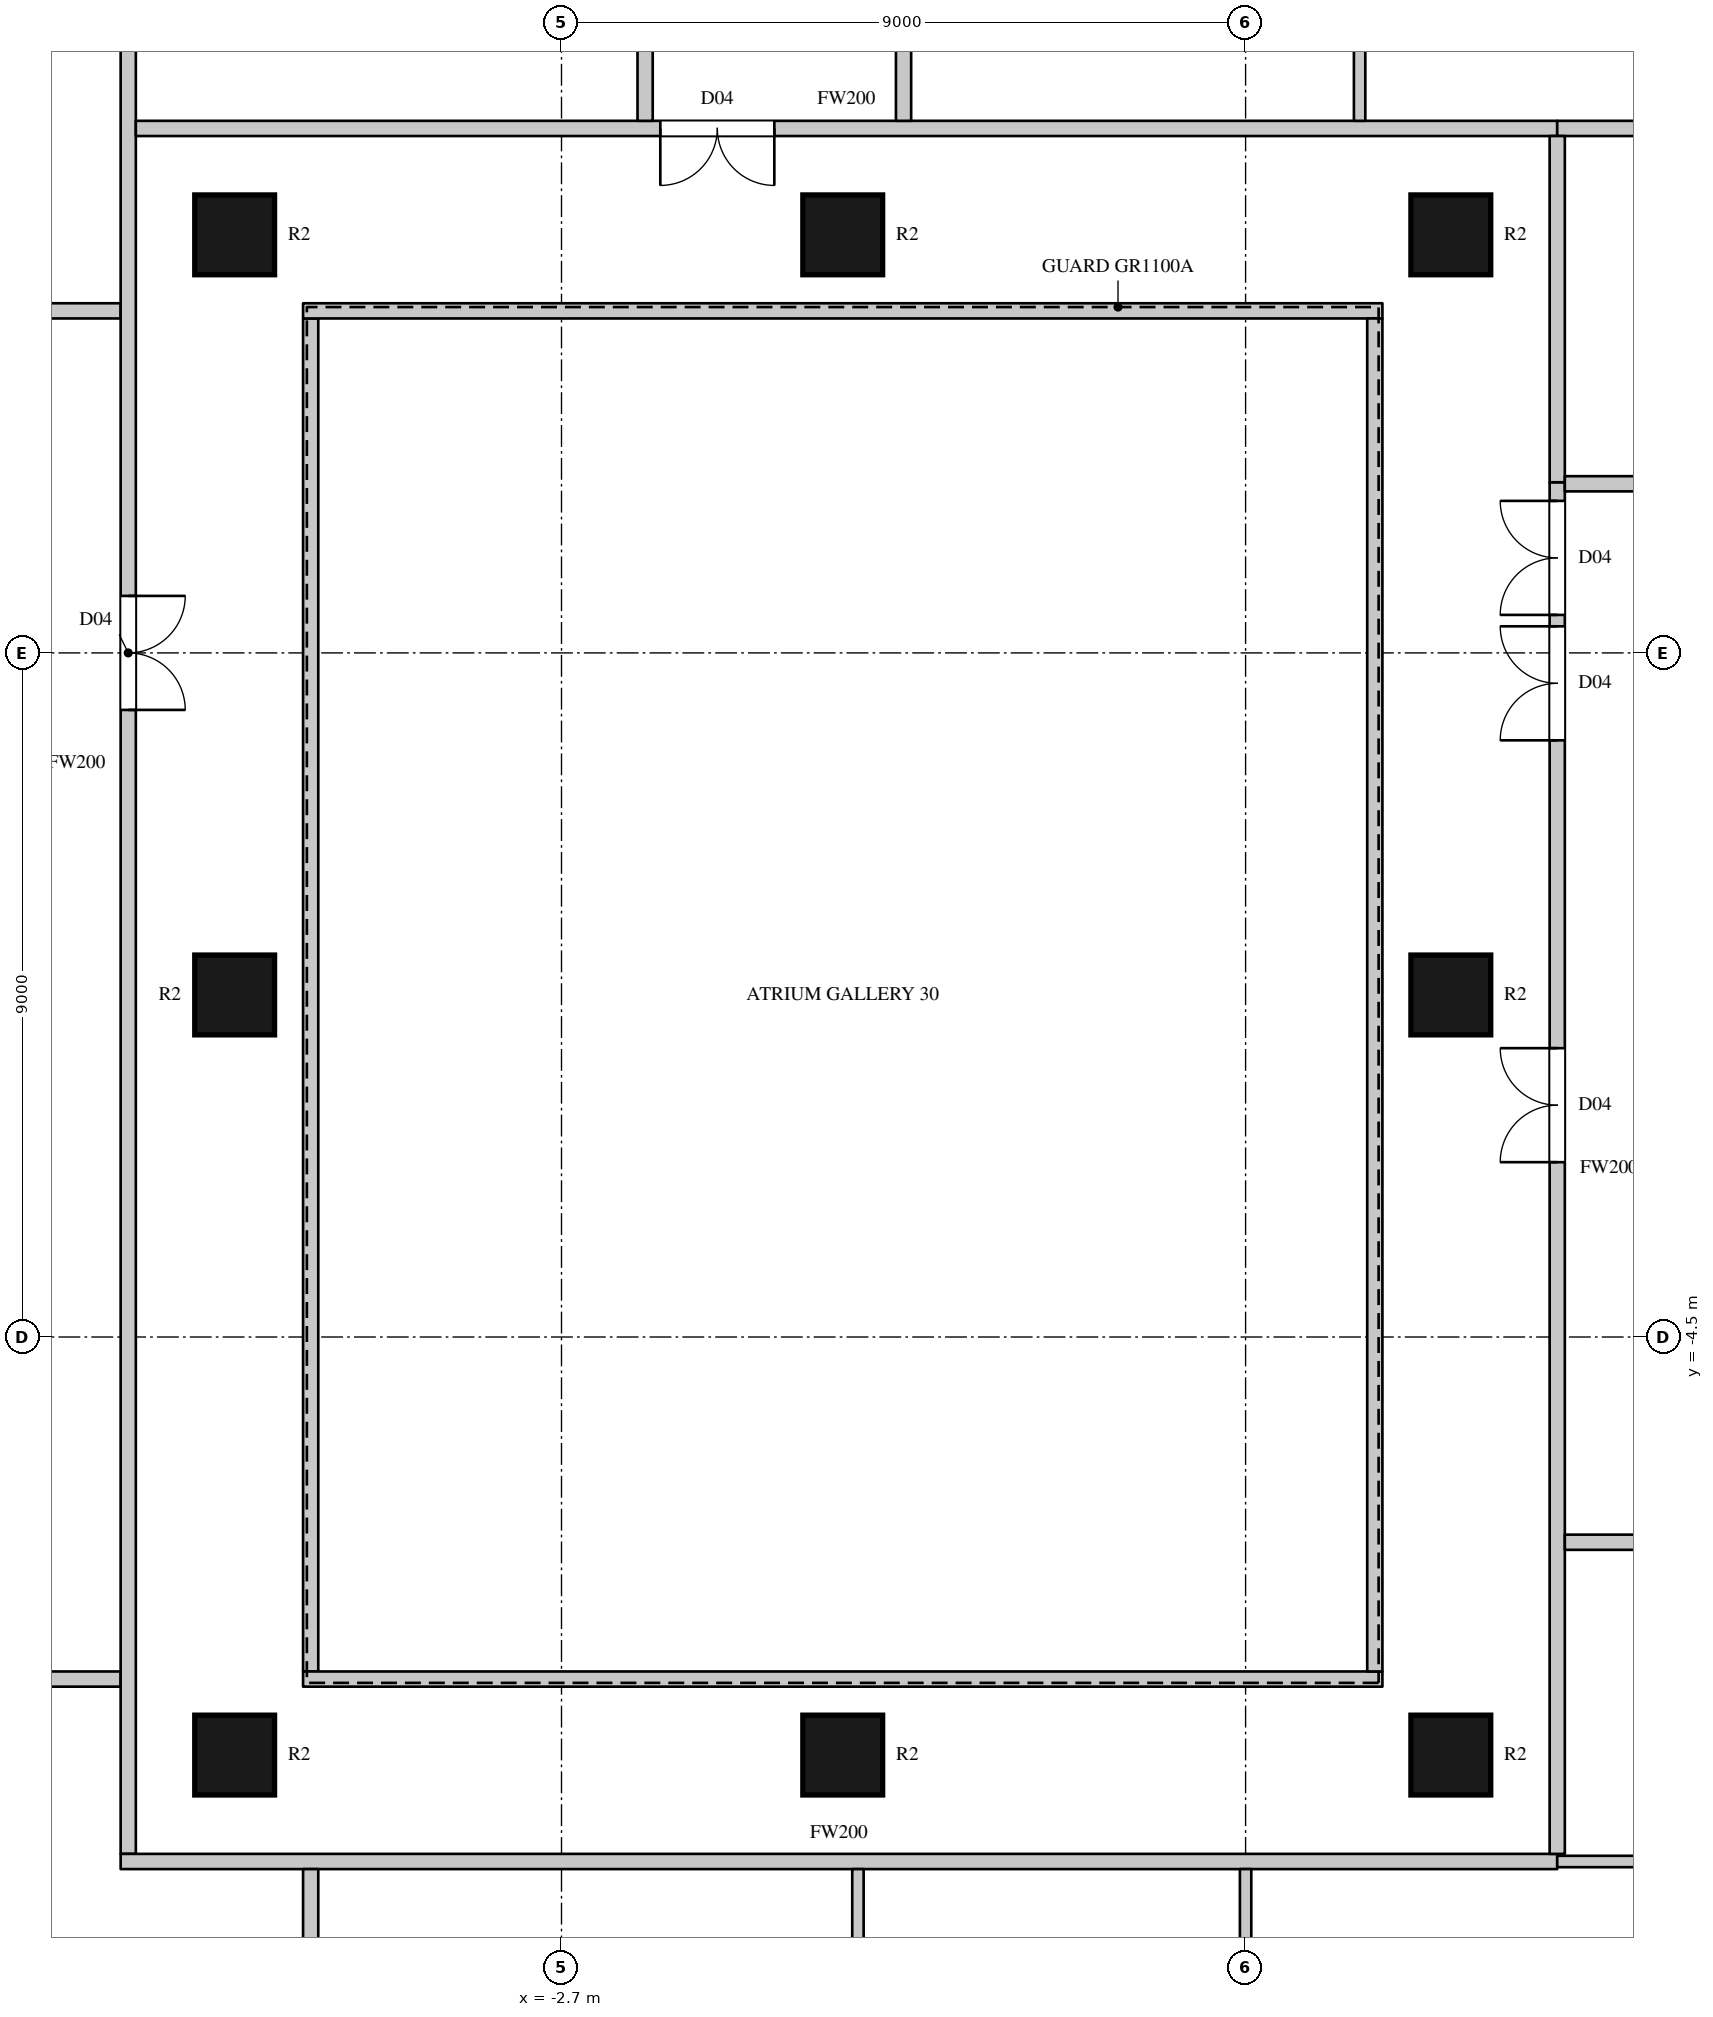
"""IFC4 building model, lengths in metres.
Left out: names, types, materials, properties, quantities, classifications, styles, units other than length and angle.
Written with IfcOpenShell. Run it as: python <this file> out.ifc"""

import sys

from ifc_helpers import new_model, si_unit, direction, frame, frame_2d, origin, origin_2d, place, context, subcontext, project, spatial, rectangle, circle, extrude, element, fill, save


model = new_model("IFC4")
c1 = context("Model", 3, precision=1e-05, world=origin(), true_north=direction((0.0, 1.0)))
c2 = subcontext(c1, "Body", "Model", "MODEL_VIEW")
j1 = project(units=[si_unit("LENGTHUNIT", "METRE"), si_unit("PLANEANGLEUNIT", "RADIAN")], contexts=[c1])
p1 = place(None, origin())
s1 = spatial("IfcSite", under=j1, at=p1, CompositionType="ELEMENT")
p2 = place(p1, origin())
s2 = spatial("IfcBuilding", under=s1, at=p2, CompositionType="ELEMENT")
p3 = place(p2, frame((0.0, 0.0, 138.3)))
s3 = spatial("IfcBuildingStorey", under=s2, at=p3, CompositionType="ELEMENT", Elevation=138.3)
for number, where, z_axis, x_axis in (
    (1, (-7.0, -10.0, 0.0), (0.0, 0.0, 1.0), (1.0, 0.0, 0.0)),
    (2, (-7.0, 0.0, 0.0), (0.0, 0.0, 1.0), (1.0, 0.0, 0.0)),
    (3, (-7.0, 10.0, 0.0), (0.0, 0.0, 1.0), (1.0, 0.0, 0.0)),
    (4, (1.0, -10.0, 0.0), (0.0, 0.0, 1.0), (1.0, 0.0, 0.0)),
    (5, (1.0, 10.0, 0.0), (0.0, 0.0, 1.0), (1.0, 0.0, 0.0)),
    (6, (9.0, -10.0, 0.0), (0.0, 0.0, 1.0), (1.0, 0.0, 0.0)),
    (7, (9.0, 0.0, 0.0), (0.0, 0.0, 1.0), (1.0, 0.0, 0.0)),
    (8, (9.0, 10.0, 0.0), (0.0, 0.0, 1.0), (1.0, 0.0, 0.0)),
):
    element("IfcColumn", number, at=place(p3, frame(where, z_axis=z_axis, x_axis=x_axis)), inside=s3, PredefinedType="COLUMN", context=c2, shape_type="SweptSolid", body=[
        extrude(circle(Radius=0.525, at=origin_2d()), origin(), (0.0, 0.0, 1.0), 3.6),
    ])
p4 = place(p3, frame((-13.97, -9.0, 0.0), z_axis=(0.0, 0.0, 1.0), x_axis=(1.0, 0.0, 0.0)))
e9 = element("IfcWall", 9, at=p4, inside=s3, PredefinedType="PARTITIONING", context=c2, shape_type="SweptSolid", body=[
    extrude(rectangle(XDim=5.47, YDim=0.2, at=frame_2d((2.735, 0.0))), origin(), (0.0, 0.0, 1.0), 3.3),
])
p5 = place(p4, frame((0.4, 0.0, 0.0)))
e10 = element("IfcOpeningElement", 10, at=p5, cuts=e9, PredefinedType="OPENING", context=c2, shape_type="SweptSolid", body=[
    extrude(rectangle(XDim=1.5, YDim=2.2, at=frame_2d((0.75, 1.1))), frame((0.0, 0.11, 0.0), z_axis=(0.0, -1.0, 0.0), x_axis=(1.0, 0.0, 0.0)), (0.0, 0.0, 1.0), 0.22),
])
p6 = place(p4, frame((2.05, 0.0, 0.0)))
e11 = element("IfcOpeningElement", 11, at=p6, cuts=e9, PredefinedType="OPENING", context=c2, shape_type="SweptSolid", body=[
    extrude(rectangle(XDim=1.5, YDim=2.2, at=frame_2d((0.75, 1.1))), frame((0.0, 0.11, 0.0), z_axis=(0.0, -1.0, 0.0), x_axis=(1.0, 0.0, 0.0)), (0.0, 0.0, 1.0), 0.22),
])
p7 = place(p3, frame((-13.97, 9.0, 0.0), z_axis=(0.0, 0.0, 1.0), x_axis=(1.0, 0.0, 0.0)))
e12 = element("IfcWall", 12, at=p7, inside=s3, PredefinedType="PARTITIONING", context=c2, shape_type="SweptSolid", body=[
    extrude(rectangle(XDim=5.47, YDim=0.2, at=frame_2d((2.735, 0.0))), origin(), (0.0, 0.0, 1.0), 3.3),
])
p8 = place(p3, frame((-8.4, -11.3, 0.0), z_axis=(0.0, 0.0, 1.0), x_axis=(0.0, 1.0, 0.0)))
e13 = element("IfcWall", 13, at=p8, inside=s3, PredefinedType="PARTITIONING", context=c2, shape_type="SweptSolid", body=[
    extrude(rectangle(XDim=28.7, YDim=0.2, at=frame_2d((14.35, 0.0))), origin(), (0.0, 0.0, 1.0), 3.3),
])
p9 = place(p8, frame((15.05, 0.0, 0.0)))
e14 = element("IfcOpeningElement", 14, at=p9, cuts=e13, PredefinedType="OPENING", context=c2, shape_type="SweptSolid", body=[
    extrude(rectangle(XDim=1.5, YDim=2.2, at=frame_2d((0.75, 1.1))), frame((0.0, 0.11, 0.0), z_axis=(0.0, -1.0, 0.0), x_axis=(1.0, 0.0, 0.0)), (0.0, 0.0, 1.0), 0.22),
])
p10 = place(p8, frame((26.95, 0.0, 0.0)))
e15 = element("IfcOpeningElement", 15, at=p10, cuts=e13, PredefinedType="OPENING", context=c2, shape_type="SweptSolid", body=[
    extrude(rectangle(XDim=1.6, YDim=2.4, at=frame_2d((0.8, 1.2))), frame((0.0, 0.11, 0.0), z_axis=(0.0, -1.0, 0.0), x_axis=(1.0, 0.0, 0.0)), (0.0, 0.0, 1.0), 0.22),
])
p11 = place(p3, frame((-8.5, -11.4, 0.0), z_axis=(0.0, 0.0, 1.0), x_axis=(1.0, 0.0, 0.0)))
e16 = element("IfcWall", 16, at=p11, inside=s3, PredefinedType="PARTITIONING", context=c2, shape_type="SweptSolid", body=[
    extrude(rectangle(XDim=18.9, YDim=0.2, at=frame_2d((9.45, 0.0))), origin(), (0.0, 0.0, 1.0), 3.3),
])
p12 = place(p3, frame((-8.3, 11.4, 0.0), z_axis=(0.0, 0.0, 1.0), x_axis=(1.0, 0.0, 0.0)))
e17 = element("IfcWall", 17, at=p12, inside=s3, PredefinedType="PARTITIONING", context=c2, shape_type="SweptSolid", body=[
    extrude(rectangle(XDim=18.7, YDim=0.2, at=frame_2d((9.35, 0.0))), origin(), (0.0, 0.0, 1.0), 3.3),
])
p13 = place(p12, frame((6.9, 0.0, 0.0)))
e18 = element("IfcOpeningElement", 18, at=p13, cuts=e17, PredefinedType="OPENING", context=c2, shape_type="SweptSolid", body=[
    extrude(rectangle(XDim=1.5, YDim=2.2, at=frame_2d((0.75, 1.1))), frame((0.0, 0.11, 0.0), z_axis=(0.0, -1.0, 0.0), x_axis=(1.0, 0.0, 0.0)), (0.0, 0.0, 1.0), 0.22),
])
p14 = place(p3, frame((-6.0, -17.4, 0.0), z_axis=(0.0, 0.0, 1.0), x_axis=(0.0, 1.0, 0.0)))
e19 = element("IfcWall", 19, at=p14, inside=s3, PredefinedType="PARTITIONING", context=c2, shape_type="SweptSolid", body=[
    extrude(rectangle(XDim=5.9, YDim=0.2, at=frame_2d((2.95, 0.0))), origin(), (0.0, 0.0, 1.0), 3.3),
])
p15 = place(p14, frame((0.15, 0.0, 0.0)))
e20 = element("IfcOpeningElement", 20, at=p15, cuts=e19, PredefinedType="OPENING", context=c2, shape_type="SweptSolid", body=[
    extrude(rectangle(XDim=0.95, YDim=2.2, at=frame_2d((0.475, 1.1))), frame((0.0, 0.11, 0.0), z_axis=(0.0, -1.0, 0.0), x_axis=(1.0, 0.0, 0.0)), (0.0, 0.0, 1.0), 0.22),
])
p16 = place(p3, frame((-6.0, -8.9, 0.0), z_axis=(0.0, 0.0, 1.0), x_axis=(0.0, 1.0, 0.0)))
e21 = element("IfcWall", 21, at=p16, inside=s3, PredefinedType="PARTITIONING", context=c2, shape_type="SweptSolid", body=[
    extrude(rectangle(XDim=17.8, YDim=0.2, at=frame_2d((8.9, 0.0))), origin(), (0.0, 0.0, 1.0), 3.3),
])
for number, where, z_axis, x_axis in (
    (22, (-6.1, -9.0, 0.0), (0.0, 0.0, 1.0), (1.0, 0.0, 0.0)),
    (23, (-6.1, 9.0, 0.0), (0.0, 0.0, 1.0), (1.0, 0.0, 0.0)),
):
    element("IfcWall", number, at=place(p3, frame(where, z_axis=z_axis, x_axis=x_axis)), inside=s3, PredefinedType="PARTITIONING", context=c2, shape_type="SweptSolid", body=[
        extrude(rectangle(XDim=14.2, YDim=0.2, at=frame_2d((7.1, 0.0))), origin(), (0.0, 0.0, 1.0), 3.3),
    ])
p17 = place(p3, frame((-1.6, 11.5, 0.0), z_axis=(0.0, 0.0, 1.0), x_axis=(0.0, 1.0, 0.0)))
e24 = element("IfcWall", 24, at=p17, inside=s3, PredefinedType="PARTITIONING", context=c2, shape_type="SweptSolid", body=[
    extrude(rectangle(XDim=5.9, YDim=0.2, at=frame_2d((2.95, 0.0))), origin(), (0.0, 0.0, 1.0), 3.3),
])
p18 = place(p3, frame((1.8, 11.5, 0.0), z_axis=(0.0, 0.0, 1.0), x_axis=(0.0, 1.0, 0.0)))
e25 = element("IfcWall", 25, at=p18, inside=s3, PredefinedType="PARTITIONING", context=c2, shape_type="SweptSolid", body=[
    extrude(rectangle(XDim=5.9, YDim=0.2, at=frame_2d((2.95, 0.0))), origin(), (0.0, 0.0, 1.0), 3.3),
])
p19 = place(p18, frame((4.15, 0.0, 0.0)))
e26 = element("IfcOpeningElement", 26, at=p19, cuts=e25, PredefinedType="OPENING", context=c2, shape_type="SweptSolid", body=[
    extrude(rectangle(XDim=1.6, YDim=2.4, at=frame_2d((0.8, 1.2))), frame((0.0, 0.11, 0.0), z_axis=(0.0, -1.0, 0.0), x_axis=(1.0, 0.0, 0.0)), (0.0, 0.0, 1.0), 0.22),
])
p20 = place(p3, frame((8.0, -8.9, 0.0), z_axis=(0.0, 0.0, 1.0), x_axis=(0.0, 1.0, 0.0)))
e27 = element("IfcWall", 27, at=p20, inside=s3, PredefinedType="PARTITIONING", context=c2, shape_type="SweptSolid", body=[
    extrude(rectangle(XDim=17.8, YDim=0.2, at=frame_2d((8.9, 0.0))), origin(), (0.0, 0.0, 1.0), 3.3),
])
p21 = place(p3, frame((10.4, -11.3, 0.0), z_axis=(0.0, 0.0, 1.0), x_axis=(0.0, 1.0, 0.0)))
e28 = element("IfcWall", 28, at=p21, inside=s3, PredefinedType="PARTITIONING", context=c2, shape_type="SweptSolid", body=[
    extrude(rectangle(XDim=18.045, YDim=0.2, at=frame_2d((9.022, 0.0))), origin(), (0.0, 0.0, 1.0), 3.3),
])
p22 = place(p21, frame((16.3, 0.0, 0.0)))
e29 = element("IfcOpeningElement", 29, at=p22, cuts=e28, PredefinedType="OPENING", context=c2, shape_type="SweptSolid", body=[
    extrude(rectangle(XDim=1.5, YDim=2.2, at=frame_2d((0.75, 1.1))), frame((0.0, 0.11, 0.0), z_axis=(0.0, -1.0, 0.0), x_axis=(1.0, 0.0, 0.0)), (0.0, 0.0, 1.0), 0.22),
])
p23 = place(p21, frame((14.65, 0.0, 0.0)))
e30 = element("IfcOpeningElement", 30, at=p23, cuts=e28, PredefinedType="OPENING", context=c2, shape_type="SweptSolid", body=[
    extrude(rectangle(XDim=1.5, YDim=2.2, at=frame_2d((0.75, 1.1))), frame((0.0, 0.11, 0.0), z_axis=(0.0, -1.0, 0.0), x_axis=(1.0, 0.0, 0.0)), (0.0, 0.0, 1.0), 0.22),
])
p24 = place(p21, frame((9.1, 0.0, 0.0)))
e31 = element("IfcOpeningElement", 31, at=p24, cuts=e28, PredefinedType="OPENING", context=c2, shape_type="SweptSolid", body=[
    extrude(rectangle(XDim=1.5, YDim=2.2, at=frame_2d((0.75, 1.1))), frame((0.0, 0.11, 0.0), z_axis=(0.0, -1.0, 0.0), x_axis=(1.0, 0.0, 0.0)), (0.0, 0.0, 1.0), 0.22),
])
p25 = place(p3, frame((10.5, -7.2, 0.0), z_axis=(0.0, 0.0, 1.0), x_axis=(1.0, 0.0, 0.0)))
e32 = element("IfcWall", 32, at=p25, inside=s3, PredefinedType="PARTITIONING", context=c2, shape_type="SweptSolid", body=[
    extrude(rectangle(XDim=5.7, YDim=0.2, at=frame_2d((2.85, 0.0))), origin(), (0.0, 0.0, 1.0), 3.3),
])
p26 = place(p25, frame((4.45, 0.0, 0.0)))
e33 = element("IfcOpeningElement", 33, at=p26, cuts=e32, PredefinedType="OPENING", context=c2, shape_type="SweptSolid", body=[
    extrude(rectangle(XDim=0.9, YDim=2.2, at=frame_2d((0.45, 1.1))), frame((0.0, 0.11, 0.0), z_axis=(0.0, -1.0, 0.0), x_axis=(1.0, 0.0, 0.0)), (0.0, 0.0, 1.0), 0.22),
])
p27 = place(p3, frame((1.2, -17.4, 0.0), z_axis=(0.0, 0.0, 1.0), x_axis=(0.0, 1.0, 0.0)))
e34 = element("IfcWall", 34, at=p27, inside=s3, PredefinedType="PARTITIONING", context=c2, shape_type="SweptSolid", body=[
    extrude(rectangle(XDim=5.9, YDim=0.15, at=frame_2d((2.95, 0.0))), origin(), (0.0, 0.0, 1.0), 3.3),
])
p28 = place(p3, frame((6.3, -16.975, 0.0), z_axis=(0.0, 0.0, 1.0), x_axis=(0.0, 1.0, 0.0)))
e35 = element("IfcWall", 35, at=p28, inside=s3, PredefinedType="PARTITIONING", context=c2, shape_type="SweptSolid", body=[
    extrude(rectangle(XDim=5.475, YDim=0.15, at=frame_2d((2.738, 0.0))), origin(), (0.0, 0.0, 1.0), 2.75),
])
p29 = place(p3, frame((7.8, 11.5, 0.0), z_axis=(0.0, 0.0, 1.0), x_axis=(0.0, 1.0, 0.0)))
e36 = element("IfcWall", 36, at=p29, inside=s3, PredefinedType="PARTITIONING", context=c2, shape_type="SweptSolid", body=[
    extrude(rectangle(XDim=5.9, YDim=0.15, at=frame_2d((2.95, 0.0))), origin(), (0.0, 0.0, 1.0), 3.3),
])
p30 = place(p3, frame((10.4, -11.4, 0.0), z_axis=(0.0, 0.0, 1.0), x_axis=(1.0, 0.0, 0.0)))
e37 = element("IfcWall", 37, at=p30, inside=s3, PredefinedType="PARTITIONING", context=c2, shape_type="SweptSolid", body=[
    extrude(rectangle(XDim=5.6, YDim=0.15, at=frame_2d((2.8, 0.0))), origin(), (0.0, 0.0, 1.0), 3.3),
])
p31 = place(p3, frame((10.4, 11.4, 0.0), z_axis=(0.0, 0.0, 1.0), x_axis=(1.0, 0.0, 0.0)))
e38 = element("IfcWall", 38, at=p31, inside=s3, PredefinedType="PARTITIONING", context=c2, shape_type="SweptSolid", body=[
    extrude(rectangle(XDim=5.6, YDim=0.2, at=frame_2d((2.8, 0.0))), origin(), (0.0, 0.0, 1.0), 3.3),
])
p32 = place(p3, frame((10.4, 6.745, 0.0), z_axis=(0.0, 0.0, 1.0), x_axis=(0.0, 1.0, 0.0)))
e39 = element("IfcWall", 39, at=p32, inside=s3, PredefinedType="PARTITIONING", context=c2, shape_type="SweptSolid", body=[
    extrude(rectangle(XDim=4.555, YDim=0.2, at=frame_2d((2.277, 0.0))), origin(), (0.0, 0.0, 1.0), 3.3),
])
p33 = place(p3, frame((10.5, 6.725, 0.0), z_axis=(0.0, 0.0, 1.0), x_axis=(1.0, 0.0, 0.0)))
e40 = element("IfcWall", 40, at=p33, inside=s3, PredefinedType="PARTITIONING", context=c2, shape_type="SweptSolid", body=[
    extrude(rectangle(XDim=5.7, YDim=0.2, at=frame_2d((2.85, 0.0))), origin(), (0.0, 0.0, 1.0), 3.3),
])
p34 = place(p33, frame((4.75, 0.0, 0.0)))
e41 = element("IfcOpeningElement", 41, at=p34, cuts=e40, PredefinedType="OPENING", context=c2, shape_type="SweptSolid", body=[
    extrude(rectangle(XDim=0.6, YDim=2.0, at=frame_2d((0.3, 1.0))), frame((0.0, 0.11, 0.0), z_axis=(0.0, -1.0, 0.0), x_axis=(1.0, 0.0, 0.0)), (0.0, 0.0, 1.0), 0.22),
])
p35 = place(p9, origin())
e42 = element("IfcDoor", 42, at=p35, inside=s3, OperationType="DOUBLE_DOOR_SINGLE_SWING", PredefinedType="DOOR", context=c2, shape_type="SweptSolid", body=[
    extrude(rectangle(XDim=1.5, YDim=2.2, at=frame_2d((0.75, 1.1))), frame((0.0, 0.025, 0.0), z_axis=(0.0, -1.0, 0.0), x_axis=(1.0, 0.0, 0.0)), (0.0, 0.0, 1.0), 0.05),
])
fill(e14, e42)
p36 = place(p13, origin())
e43 = element("IfcDoor", 43, at=p36, inside=s3, OperationType="DOUBLE_DOOR_SINGLE_SWING", PredefinedType="DOOR", context=c2, shape_type="SweptSolid", body=[
    extrude(rectangle(XDim=1.5, YDim=2.2, at=frame_2d((0.75, 1.1))), frame((0.0, 0.025, 0.0), z_axis=(0.0, -1.0, 0.0), x_axis=(1.0, 0.0, 0.0)), (0.0, 0.0, 1.0), 0.05),
])
fill(e18, e43)
p37 = place(p22, origin())
e44 = element("IfcDoor", 44, at=p37, inside=s3, OperationType="DOUBLE_DOOR_SINGLE_SWING", PredefinedType="DOOR", context=c2, shape_type="SweptSolid", body=[
    extrude(rectangle(XDim=1.5, YDim=2.2, at=frame_2d((0.75, 1.1))), frame((0.0, 0.025, 0.0), z_axis=(0.0, -1.0, 0.0), x_axis=(1.0, 0.0, 0.0)), (0.0, 0.0, 1.0), 0.05),
])
fill(e29, e44)
p38 = place(p23, origin())
e45 = element("IfcDoor", 45, at=p38, inside=s3, OperationType="DOUBLE_DOOR_SINGLE_SWING", PredefinedType="DOOR", context=c2, shape_type="SweptSolid", body=[
    extrude(rectangle(XDim=1.5, YDim=2.2, at=frame_2d((0.75, 1.1))), frame((0.0, 0.025, 0.0), z_axis=(0.0, -1.0, 0.0), x_axis=(1.0, 0.0, 0.0)), (0.0, 0.0, 1.0), 0.05),
])
fill(e30, e45)
p39 = place(p24, origin())
e46 = element("IfcDoor", 46, at=p39, inside=s3, OperationType="DOUBLE_DOOR_SINGLE_SWING", PredefinedType="DOOR", context=c2, shape_type="SweptSolid", body=[
    extrude(rectangle(XDim=1.5, YDim=2.2, at=frame_2d((0.75, 1.1))), frame((0.0, 0.025, 0.0), z_axis=(0.0, -1.0, 0.0), x_axis=(1.0, 0.0, 0.0)), (0.0, 0.0, 1.0), 0.05),
])
fill(e31, e46)
save(model, sys.argv[1])
